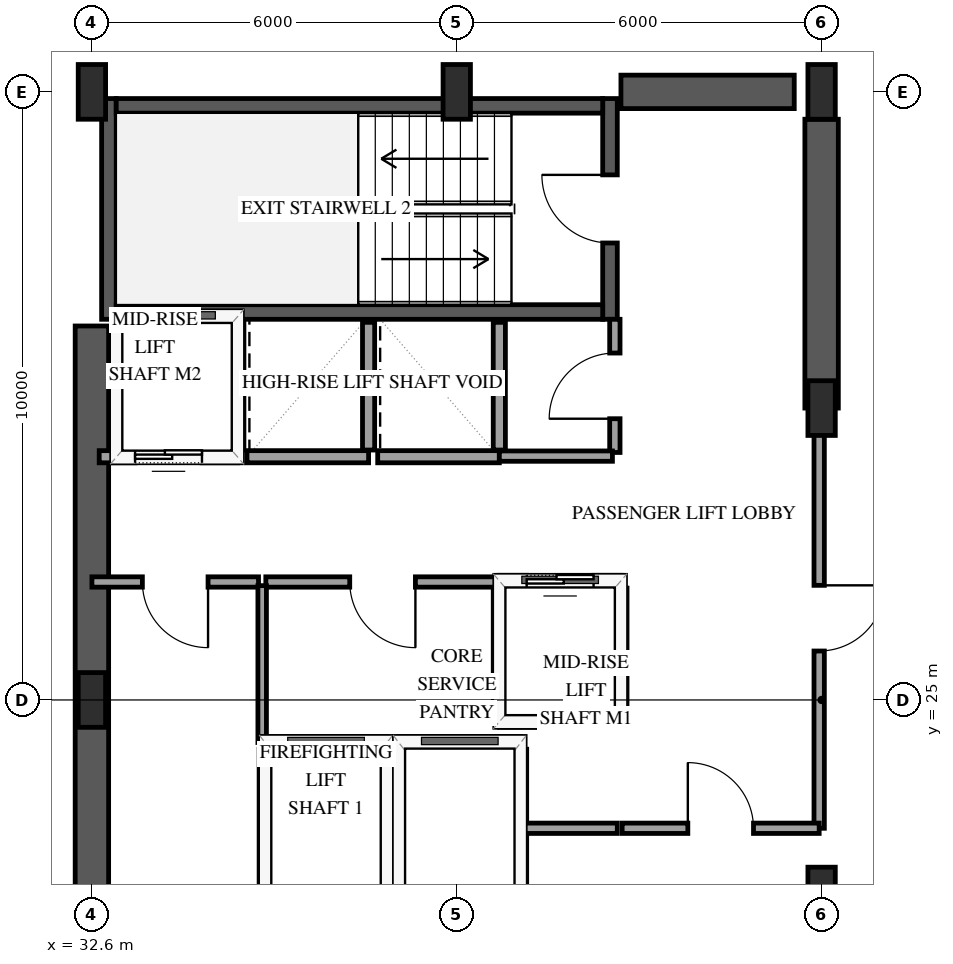
"""IFC4 building model, lengths in metres.
Left out: names, types, materials, properties, quantities, classifications, styles, units other than length and angle.
Written with IfcOpenShell. Run it as: python <this file> out.ifc"""

import sys

from ifc_helpers import new_model, si_unit, direction, frame, frame_2d, origin, origin_2d, place, context, subcontext, project, spatial, rectangle, extrude, element, fill, save


model = new_model("IFC4")
c1 = context("Model", 3, precision=1e-05, world=origin(), true_north=direction((0.0, 1.0)))
c2 = subcontext(c1, "Body", "Model", "MODEL_VIEW")
j1 = project(units=[si_unit("LENGTHUNIT", "METRE"), si_unit("PLANEANGLEUNIT", "RADIAN")], contexts=[c1])
p1 = place(None, origin())
s1 = spatial("IfcSite", under=j1, at=p1, CompositionType="ELEMENT")
p2 = place(p1, origin())
s2 = spatial("IfcBuilding", under=s1, at=p2, CompositionType="ELEMENT")
p3 = place(p2, frame((0.0, 0.0, 160.6)))
s3 = spatial("IfcBuildingStorey", under=s2, at=p3, CompositionType="ELEMENT", Elevation=160.6)
p4 = place(p3, frame((32.88, 31.26, 0.0), z_axis=(0.0, 0.0, 1.0), x_axis=(0.0, 1.0, 0.0)))
e1 = element("IfcWall", 1, at=p4, inside=s3, PredefinedType="SHEAR", context=c2, shape_type="SweptSolid", body=[
    extrude(rectangle(XDim=3.63, YDim=0.24, at=frame_2d((1.815, 0.0))), origin(), (0.0, 0.0, 1.0), 3.6),
])
p5 = place(p3, frame((41.12, 31.26, 0.0), z_axis=(0.0, 0.0, 1.0), x_axis=(0.0, 1.0, 0.0)))
e2 = element("IfcWall", 2, at=p5, inside=s3, PredefinedType="SHEAR", context=c2, shape_type="SweptSolid", body=[
    extrude(rectangle(XDim=3.63, YDim=0.24, at=frame_2d((1.815, 0.0))), origin(), (0.0, 0.0, 1.0), 3.6),
])
p6 = place(p5, frame((1.255, 0.0, 0.0)))
e3 = element("IfcOpeningElement", 3, at=p6, cuts=e2, PredefinedType="OPENING", context=c2, shape_type="SweptSolid", body=[
    extrude(rectangle(XDim=1.12, YDim=2.15, at=frame_2d((0.56, 1.075))), frame((0.0, 0.13, 0.0), z_axis=(0.0, -1.0, 0.0), x_axis=(1.0, 0.0, 0.0)), (0.0, 0.0, 1.0), 0.26),
])
for number, where, z_axis, x_axis in (
    (4, (33.0, 31.38, 0.0), (0.0, 0.0, 1.0), (1.0, 0.0, 0.0)),
    (5, (33.0, 34.77, 0.0), (0.0, 0.0, 1.0), (1.0, 0.0, 0.0)),
):
    element("IfcWall", number, at=place(p3, frame(where, z_axis=z_axis, x_axis=x_axis)), inside=s3, PredefinedType="SHEAR", context=c2, shape_type="SweptSolid", body=[
        extrude(rectangle(XDim=8.0, YDim=0.24, at=frame_2d((4.0, 0.0))), origin(), (0.0, 0.0, 1.0), 3.6),
    ])
p7 = place(p3, frame((32.6, 18.85, 0.0), z_axis=(0.0, 0.0, 1.0), x_axis=(0.0, 1.0, 0.0)))
e6 = element("IfcWall", 6, at=p7, inside=s3, PredefinedType="SHEAR", context=c2, shape_type="SweptSolid", body=[
    extrude(rectangle(XDim=12.3, YDim=0.55, at=frame_2d((6.15, 0.0))), origin(), (0.0, 0.0, 1.0), 3.6),
])
p8 = place(p3, frame((41.3, 35.0, 0.0), z_axis=(0.0, 0.0, 1.0), x_axis=(1.0, 0.0, 0.0)))
e7 = element("IfcWall", 7, at=p8, inside=s3, PredefinedType="SHEAR", context=c2, shape_type="SweptSolid", body=[
    extrude(rectangle(XDim=2.85, YDim=0.55, at=frame_2d((1.425, 0.0))), origin(), (0.0, 0.0, 1.0), 3.6),
])
p9 = place(p3, frame((44.6, 29.8, 0.0), z_axis=(0.0, 0.0, 1.0), x_axis=(0.0, 1.0, 0.0)))
e8 = element("IfcWall", 8, at=p9, inside=s3, PredefinedType="SHEAR", context=c2, shape_type="SweptSolid", body=[
    extrude(rectangle(XDim=4.75, YDim=0.55, at=frame_2d((2.375, 0.0))), origin(), (0.0, 0.0, 1.0), 3.6),
])
for number, where, z_axis, x_axis in (
    (9, (32.6, 25.0, 0.0), (0.0, 0.0, 1.0), (1.0, 0.0, 0.0)),
    (10, (32.6, 35.0, 0.0), (0.0, 0.0, 1.0), (1.0, 0.0, 0.0)),
    (11, (38.6, 35.0, 0.0), (0.0, 0.0, 1.0), (1.0, 0.0, 0.0)),
    (12, (44.6, 21.8, 0.0), (0.0, 0.0, 1.0), (1.0, 0.0, 0.0)),
    (13, (44.6, 29.8, 0.0), (0.0, 0.0, 1.0), (1.0, 0.0, 0.0)),
    (14, (44.6, 35.0, 0.0), (0.0, 0.0, 1.0), (1.0, 0.0, 0.0)),
):
    element("IfcColumn", number, at=place(p3, frame(where, z_axis=z_axis, x_axis=x_axis)), inside=s3, PredefinedType="PILASTER", context=c2, shape_type="SweptSolid", body=[
        extrude(rectangle(XDim=0.45, YDim=0.9, at=origin_2d()), origin(), (0.0, 0.0, 1.0), 3.6),
    ])
p10 = place(p3, frame((35.45, 24.3, 0.0), z_axis=(0.0, 0.0, 1.0), x_axis=(1.0, 0.0, 0.0)))
e15 = element("IfcWall", 15, at=p10, inside=s3, PredefinedType="SOLIDWALL", context=c2, shape_type="SweptSolid", body=[
    extrude(rectangle(XDim=2.0, YDim=0.2, at=frame_2d((1.0, 0.0))), origin(), (0.0, 0.0, 1.0), 3.3),
])
for number, where, z_axis, x_axis in (
    (16, (35.45, 21.81, 0.0), (0.0, 0.0, 1.0), (0.0, 1.0, 0.0)),
    (17, (37.45, 21.81, 0.0), (0.0, 0.0, 1.0), (0.0, 1.0, 0.0)),
):
    element("IfcWall", number, at=place(p3, frame(where, z_axis=z_axis, x_axis=x_axis)), inside=s3, PredefinedType="SOLIDWALL", context=c2, shape_type="SweptSolid", body=[
        extrude(rectangle(XDim=2.38, YDim=0.2, at=frame_2d((1.19, 0.0))), origin(), (0.0, 0.0, 1.0), 3.3),
    ])
p11 = place(p3, frame((37.65, 24.3, 0.0), z_axis=(0.0, 0.0, 1.0), x_axis=(1.0, 0.0, 0.0)))
e18 = element("IfcWall", 18, at=p11, inside=s3, PredefinedType="SOLIDWALL", context=c2, shape_type="SweptSolid", body=[
    extrude(rectangle(XDim=2.0, YDim=0.2, at=frame_2d((1.0, 0.0))), origin(), (0.0, 0.0, 1.0), 3.3),
])
p12 = place(p3, frame((39.65, 21.81, 0.0), z_axis=(0.0, 0.0, 1.0), x_axis=(0.0, 1.0, 0.0)))
e19 = element("IfcWall", 19, at=p12, inside=s3, PredefinedType="SOLIDWALL", context=c2, shape_type="SweptSolid", body=[
    extrude(rectangle(XDim=2.38, YDim=0.2, at=frame_2d((1.19, 0.0))), origin(), (0.0, 0.0, 1.0), 3.3),
])
p13 = place(p3, frame((39.3, 24.65, 0.0), z_axis=(0.0, 0.0, 1.0), x_axis=(1.0, 0.0, 0.0)))
e20 = element("IfcWall", 20, at=p13, inside=s3, PredefinedType="SOLIDWALL", context=c2, shape_type="SweptSolid", body=[
    extrude(rectangle(XDim=2.0, YDim=0.2, at=frame_2d((1.0, 0.0))), origin(), (0.0, 0.0, 1.0), 3.3),
])
p14 = place(p3, frame((39.3, 26.95, 0.0), z_axis=(0.0, 0.0, 1.0), x_axis=(1.0, 0.0, 0.0)))
e21 = element("IfcWall", 21, at=p14, inside=s3, PredefinedType="SOLIDWALL", context=c2, shape_type="SweptSolid", body=[
    extrude(rectangle(XDim=2.0, YDim=0.2, at=frame_2d((1.0, 0.0))), origin(), (0.0, 0.0, 1.0), 3.3),
])
p15 = place(p14, frame((0.45, 0.0, 0.0)))
e22 = element("IfcOpeningElement", 22, at=p15, cuts=e21, PredefinedType="OPENING", context=c2, shape_type="SweptSolid", body=[
    extrude(rectangle(XDim=1.1, YDim=2.15, at=frame_2d((0.55, 1.075))), frame((0.0, 0.11, 0.0), z_axis=(0.0, -1.0, 0.0), x_axis=(1.0, 0.0, 0.0)), (0.0, 0.0, 1.0), 0.22),
])
for number, where, z_axis, x_axis in (
    (23, (39.3, 24.76, 0.0), (0.0, 0.0, 1.0), (0.0, 1.0, 0.0)),
    (24, (41.3, 24.76, 0.0), (0.0, 0.0, 1.0), (0.0, 1.0, 0.0)),
):
    element("IfcWall", number, at=place(p3, frame(where, z_axis=z_axis, x_axis=x_axis)), inside=s3, PredefinedType="SOLIDWALL", context=c2, shape_type="SweptSolid", body=[
        extrude(rectangle(XDim=2.08, YDim=0.2, at=frame_2d((1.04, 0.0))), origin(), (0.0, 0.0, 1.0), 3.3),
    ])
p16 = place(p3, frame((32.72, 29.0, 0.0), z_axis=(0.0, 0.0, 1.0), x_axis=(1.0, 0.0, 0.0)))
e25 = element("IfcWall", 25, at=p16, inside=s3, PredefinedType="SOLIDWALL", context=c2, shape_type="SweptSolid", body=[
    extrude(rectangle(XDim=2.28, YDim=0.2, at=frame_2d((1.14, 0.0))), origin(), (0.0, 0.0, 1.0), 3.3),
])
p17 = place(p16, frame((0.59, 0.0, 0.0)))
e26 = element("IfcOpeningElement", 26, at=p17, cuts=e25, PredefinedType="OPENING", context=c2, shape_type="SweptSolid", body=[
    extrude(rectangle(XDim=1.1, YDim=2.15, at=frame_2d((0.55, 1.075))), frame((0.0, 0.11, 0.0), z_axis=(0.0, -1.0, 0.0), x_axis=(1.0, 0.0, 0.0)), (0.0, 0.0, 1.0), 0.22),
])
p18 = place(p3, frame((35.0, 29.11, 0.0), z_axis=(0.0, 0.0, 1.0), x_axis=(0.0, 1.0, 0.0)))
e27 = element("IfcWall", 27, at=p18, inside=s3, PredefinedType="SOLIDWALL", context=c2, shape_type="SweptSolid", body=[
    extrude(rectangle(XDim=2.1, YDim=0.2, at=frame_2d((1.05, 0.0))), origin(), (0.0, 0.0, 1.0), 3.3),
])
p19 = place(p3, frame((35.15, 29.0, 0.0), z_axis=(0.0, 0.0, 1.0), x_axis=(1.0, 0.0, 0.0)))
e28 = element("IfcWall", 28, at=p19, inside=s3, PredefinedType="SOLIDWALL", context=c2, shape_type="SweptSolid", body=[
    extrude(rectangle(XDim=2.0, YDim=0.2, at=frame_2d((1.0, 0.0))), origin(), (0.0, 0.0, 1.0), 3.3),
])
p20 = place(p3, frame((37.15, 29.11, 0.0), z_axis=(0.0, 0.0, 1.0), x_axis=(0.0, 1.0, 0.0)))
e29 = element("IfcWall", 29, at=p20, inside=s3, PredefinedType="SOLIDWALL", context=c2, shape_type="SweptSolid", body=[
    extrude(rectangle(XDim=2.1, YDim=0.2, at=frame_2d((1.05, 0.0))), origin(), (0.0, 0.0, 1.0), 3.3),
])
p21 = place(p3, frame((37.3, 29.0, 0.0), z_axis=(0.0, 0.0, 1.0), x_axis=(1.0, 0.0, 0.0)))
e30 = element("IfcWall", 30, at=p21, inside=s3, PredefinedType="SOLIDWALL", context=c2, shape_type="SweptSolid", body=[
    extrude(rectangle(XDim=2.0, YDim=0.2, at=frame_2d((1.0, 0.0))), origin(), (0.0, 0.0, 1.0), 3.3),
])
p22 = place(p3, frame((39.3, 29.11, 0.0), z_axis=(0.0, 0.0, 1.0), x_axis=(0.0, 1.0, 0.0)))
e31 = element("IfcWall", 31, at=p22, inside=s3, PredefinedType="SOLIDWALL", context=c2, shape_type="SweptSolid", body=[
    extrude(rectangle(XDim=2.1, YDim=0.2, at=frame_2d((1.05, 0.0))), origin(), (0.0, 0.0, 1.0), 3.3),
])
p23 = place(p3, frame((44.56, 29.8, 0.0), z_axis=(0.0, 0.0, 1.0), x_axis=(0.0, -1.0, 0.0)))
e32 = element("IfcWall", 32, at=p23, inside=s3, PredefinedType="PARTITIONING", context=c2, shape_type="SweptSolid", body=[
    extrude(rectangle(XDim=6.91, YDim=0.17, at=frame_2d((3.455, 0.0))), origin(), (0.0, 0.0, 1.0), 2.34),
])
p24 = place(p23, frame((2.915, 0.0, 0.0)))
e33 = element("IfcOpeningElement", 33, at=p24, cuts=e32, PredefinedType="OPENING", context=c2, shape_type="SweptSolid", body=[
    extrude(rectangle(XDim=1.08, YDim=2.15, at=frame_2d((0.54, 1.075))), frame((0.0, 0.095, 0.0), z_axis=(0.0, -1.0, 0.0), x_axis=(1.0, 0.0, 0.0)), (0.0, 0.0, 1.0), 0.19),
])
p25 = place(p3, frame((39.3, 26.94, 0.0), z_axis=(0.0, 0.0, 1.0), x_axis=(-1.0, 0.0, 0.0)))
e34 = element("IfcWall", 34, at=p25, inside=s3, PredefinedType="PARTITIONING", context=c2, shape_type="SweptSolid", body=[
    extrude(rectangle(XDim=3.84, YDim=0.17, at=frame_2d((1.92, 0.0))), origin(), (0.0, 0.0, 1.0), 3.3),
])
p26 = place(p25, frame((1.38, 0.0, 0.0)))
e35 = element("IfcOpeningElement", 35, at=p26, cuts=e34, PredefinedType="OPENING", context=c2, shape_type="SweptSolid", body=[
    extrude(rectangle(XDim=1.08, YDim=2.15, at=frame_2d((0.54, 1.075))), frame((0.0, 0.095, 0.0), z_axis=(0.0, -1.0, 0.0), x_axis=(1.0, 0.0, 0.0)), (0.0, 0.0, 1.0), 0.19),
])
p27 = place(p3, frame((41.32, 22.89, 0.0), z_axis=(0.0, 0.0, 1.0), x_axis=(1.0, 0.0, 0.0)))
e36 = element("IfcWall", 36, at=p27, inside=s3, PredefinedType="PARTITIONING", context=c2, shape_type="SweptSolid", body=[
    extrude(rectangle(XDim=3.24, YDim=0.17, at=frame_2d((1.62, 0.0))), origin(), (0.0, 0.0, 1.0), 3.3),
])
p28 = place(p27, frame((1.08, 0.0, 0.0)))
e37 = element("IfcOpeningElement", 37, at=p28, cuts=e36, PredefinedType="OPENING", context=c2, shape_type="SweptSolid", body=[
    extrude(rectangle(XDim=1.08, YDim=2.15, at=frame_2d((0.54, 1.075))), frame((0.0, 0.095, 0.0), z_axis=(0.0, -1.0, 0.0), x_axis=(1.0, 0.0, 0.0)), (0.0, 0.0, 1.0), 0.19),
])
p29 = place(p3, frame((35.34, 26.94, 0.0), z_axis=(0.0, 0.0, 1.0), x_axis=(-1.0, 0.0, 0.0)))
e38 = element("IfcWall", 38, at=p29, inside=s3, PredefinedType="PARTITIONING", context=c2, shape_type="SweptSolid", body=[
    extrude(rectangle(XDim=2.74, YDim=0.17, at=frame_2d((1.37, 0.0))), origin(), (0.0, 0.0, 1.0), 3.3),
])
p30 = place(p29, frame((0.83, 0.0, 0.0)))
e39 = element("IfcOpeningElement", 39, at=p30, cuts=e38, PredefinedType="OPENING", context=c2, shape_type="SweptSolid", body=[
    extrude(rectangle(XDim=1.08, YDim=2.15, at=frame_2d((0.54, 1.075))), frame((0.0, 0.095, 0.0), z_axis=(0.0, -1.0, 0.0), x_axis=(1.0, 0.0, 0.0)), (0.0, 0.0, 1.0), 0.19),
])
p31 = place(p3, frame((35.4, 26.88, 0.0), z_axis=(0.0, 0.0, 1.0), x_axis=(0.0, -1.0, 0.0)))
e40 = element("IfcWall", 40, at=p31, inside=s3, PredefinedType="PARTITIONING", context=c2, shape_type="SweptSolid", body=[
    extrude(rectangle(XDim=2.58, YDim=0.14, at=frame_2d((1.29, 0.0))), origin(), (0.0, 0.0, 1.0), 3.3),
])
p32 = place(p3, frame((41.2, 29.07, 0.0), z_axis=(0.0, 0.0, 1.0), x_axis=(0.0, 1.0, 0.0)))
e41 = element("IfcWall", 41, at=p32, inside=s3, PredefinedType="PARTITIONING", context=c2, shape_type="SweptSolid", body=[
    extrude(rectangle(XDim=2.19, YDim=0.17, at=frame_2d((1.095, 0.0))), origin(), (0.0, 0.0, 1.0), 3.3),
])
p33 = place(p32, frame((0.555, 0.0, 0.0)))
e42 = element("IfcOpeningElement", 42, at=p33, cuts=e41, PredefinedType="OPENING", context=c2, shape_type="SweptSolid", body=[
    extrude(rectangle(XDim=1.08, YDim=2.15, at=frame_2d((0.54, 1.075))), frame((0.0, 0.095, 0.0), z_axis=(0.0, -1.0, 0.0), x_axis=(1.0, 0.0, 0.0)), (0.0, 0.0, 1.0), 0.19),
])
p34 = place(p3, frame((39.3, 29.01, 0.0), z_axis=(0.0, 0.0, 1.0), x_axis=(1.0, 0.0, 0.0)))
e43 = element("IfcWall", 43, at=p34, inside=s3, PredefinedType="PARTITIONING", context=c2, shape_type="SweptSolid", body=[
    extrude(rectangle(XDim=1.86, YDim=0.17, at=frame_2d((0.93, 0.0))), origin(), (0.0, 0.0, 1.0), 3.3),
])
p35 = place(p3, frame((39.72, 22.89, 0.0), z_axis=(0.0, 0.0, 1.0), x_axis=(1.0, 0.0, 0.0)))
e44 = element("IfcWall", 44, at=p35, inside=s3, PredefinedType="PARTITIONING", context=c2, shape_type="SweptSolid", body=[
    extrude(rectangle(XDim=1.52, YDim=0.17, at=frame_2d((0.76, 0.0))), origin(), (0.0, 0.0, 1.0), 3.3),
])
p36 = place(p15, origin())
e45 = element("IfcDoor", 45, at=p36, inside=s3, OperationType="SLIDING_TO_LEFT", PredefinedType="DOOR", context=c2, shape_type="SweptSolid", body=[
    extrude(rectangle(XDim=1.1, YDim=2.15, at=frame_2d((0.55, 1.075))), frame((0.0, 0.025, 0.0), z_axis=(0.0, -1.0, 0.0), x_axis=(1.0, 0.0, 0.0)), (0.0, 0.0, 1.0), 0.05),
])
fill(e22, e45)
p37 = place(p17, origin())
e46 = element("IfcDoor", 46, at=p37, inside=s3, OperationType="SLIDING_TO_LEFT", PredefinedType="DOOR", context=c2, shape_type="SweptSolid", body=[
    extrude(rectangle(XDim=1.1, YDim=2.15, at=frame_2d((0.55, 1.075))), frame((0.0, 0.025, 0.0), z_axis=(0.0, -1.0, 0.0), x_axis=(1.0, 0.0, 0.0)), (0.0, 0.0, 1.0), 0.05),
])
fill(e26, e46)
p38 = place(p6, origin())
e47 = element("IfcDoor", 47, at=p38, inside=s3, OperationType="SINGLE_SWING_RIGHT", PredefinedType="DOOR", context=c2, shape_type="SweptSolid", body=[
    extrude(rectangle(XDim=1.12, YDim=2.15, at=frame_2d((0.56, 1.075))), frame((0.0, 0.025, 0.0), z_axis=(0.0, -1.0, 0.0), x_axis=(1.0, 0.0, 0.0)), (0.0, 0.0, 1.0), 0.05),
])
fill(e3, e47)
p39 = place(p24, origin())
e48 = element("IfcDoor", 48, at=p39, inside=s3, OperationType="SINGLE_SWING_LEFT", PredefinedType="DOOR", context=c2, shape_type="SweptSolid", body=[
    extrude(rectangle(XDim=1.08, YDim=2.15, at=frame_2d((0.54, 1.075))), frame((0.0, 0.025, 0.0), z_axis=(0.0, -1.0, 0.0), x_axis=(1.0, 0.0, 0.0)), (0.0, 0.0, 1.0), 0.05),
])
fill(e33, e48)
p40 = place(p26, origin())
e49 = element("IfcDoor", 49, at=p40, inside=s3, OperationType="SINGLE_SWING_LEFT", PredefinedType="DOOR", context=c2, shape_type="SweptSolid", body=[
    extrude(rectangle(XDim=1.08, YDim=2.15, at=frame_2d((0.54, 1.075))), frame((0.0, 0.025, 0.0), z_axis=(0.0, -1.0, 0.0), x_axis=(1.0, 0.0, 0.0)), (0.0, 0.0, 1.0), 0.05),
])
fill(e35, e49)
p41 = place(p28, origin())
e50 = element("IfcDoor", 50, at=p41, inside=s3, OperationType="SINGLE_SWING_LEFT", PredefinedType="DOOR", context=c2, shape_type="SweptSolid", body=[
    extrude(rectangle(XDim=1.08, YDim=2.15, at=frame_2d((0.54, 1.075))), frame((0.0, 0.025, 0.0), z_axis=(0.0, -1.0, 0.0), x_axis=(1.0, 0.0, 0.0)), (0.0, 0.0, 1.0), 0.05),
])
fill(e37, e50)
p42 = place(p30, origin())
e51 = element("IfcDoor", 51, at=p42, inside=s3, OperationType="SINGLE_SWING_LEFT", PredefinedType="DOOR", context=c2, shape_type="SweptSolid", body=[
    extrude(rectangle(XDim=1.08, YDim=2.15, at=frame_2d((0.54, 1.075))), frame((0.0, 0.025, 0.0), z_axis=(0.0, -1.0, 0.0), x_axis=(1.0, 0.0, 0.0)), (0.0, 0.0, 1.0), 0.05),
])
fill(e39, e51)
p43 = place(p33, origin())
e52 = element("IfcDoor", 52, at=p43, inside=s3, OperationType="SINGLE_SWING_LEFT", PredefinedType="DOOR", context=c2, shape_type="SweptSolid", body=[
    extrude(rectangle(XDim=1.08, YDim=2.15, at=frame_2d((0.54, 1.075))), frame((0.0, 0.025, 0.0), z_axis=(0.0, -1.0, 0.0), x_axis=(1.0, 0.0, 0.0)), (0.0, 0.0, 1.0), 0.05),
])
fill(e42, e52)
save(model, sys.argv[1])
